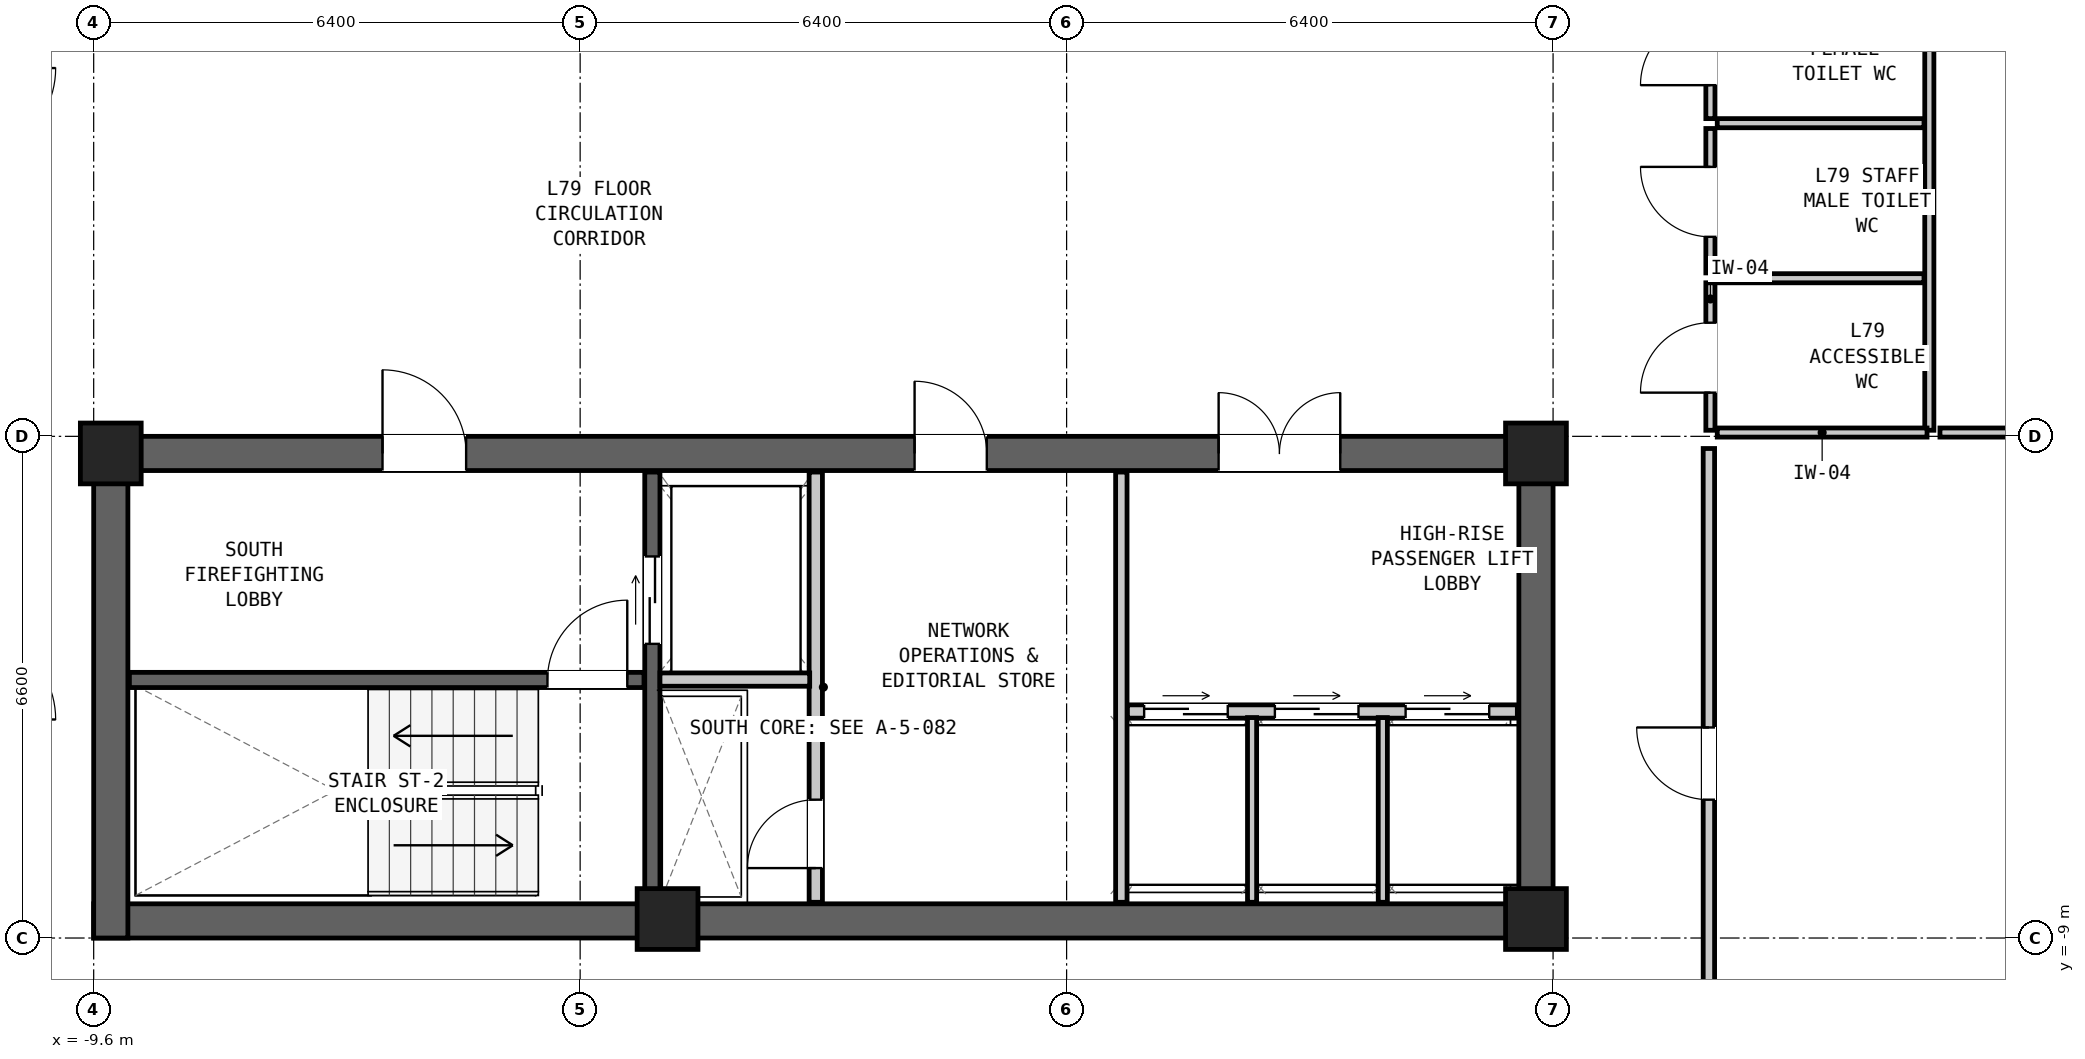
"""IFC4 building model, lengths in metres.
Left out: names, types, materials, properties, quantities, classifications, styles, units other than length and angle.
Written with IfcOpenShell. Run it as: python <this file> out.ifc"""

import sys

from ifc_helpers import new_model, si_unit, direction, frame, frame_2d, origin, origin_2d, place, context, subcontext, project, spatial, rectangle, extrude, element, fill, save


model = new_model("IFC4")
c1 = context("Model", 3, precision=1e-05, world=origin(), true_north=direction((0.0, 1.0)))
c2 = subcontext(c1, "Body", "Model", "MODEL_VIEW")
j1 = project(units=[si_unit("LENGTHUNIT", "METRE"), si_unit("PLANEANGLEUNIT", "RADIAN")], contexts=[c1])
p1 = place(None, origin())
s1 = spatial("IfcSite", under=j1, at=p1, CompositionType="ELEMENT")
p2 = place(p1, origin())
s2 = spatial("IfcBuilding", under=s1, at=p2, CompositionType="ELEMENT")
p3 = place(p2, frame((0.0, 0.0, 267.25)))
s3 = spatial("IfcBuildingStorey", under=s2, at=p3, CompositionType="ELEMENT", Elevation=267.25)
p4 = place(p3, frame((-9.6, -8.775, 0.0), z_axis=(0.0, 0.0, 1.0), x_axis=(1.0, 0.0, 0.0)))
e1 = element("IfcWall", 1, at=p4, inside=s3, PredefinedType="SHEAR", context=c2, shape_type="SweptSolid", body=[
    extrude(rectangle(XDim=19.2, YDim=0.45, at=frame_2d((9.6, 0.0))), origin(), (0.0, 0.0, 1.0), 3.05),
])
p5 = place(p3, frame((-9.6, -2.625, 0.0), z_axis=(0.0, 0.0, 1.0), x_axis=(1.0, 0.0, 0.0)))
e2 = element("IfcWall", 2, at=p5, inside=s3, PredefinedType="SHEAR", context=c2, shape_type="SweptSolid", body=[
    extrude(rectangle(XDim=19.2, YDim=0.45, at=frame_2d((9.6, 0.0))), origin(), (0.0, 0.0, 1.0), 3.05),
])
p6 = place(p5, frame((3.8, 0.0, 0.0)))
e3 = element("IfcOpeningElement", 3, at=p6, cuts=e2, PredefinedType="OPENING", context=c2, shape_type="SweptSolid", body=[
    extrude(rectangle(XDim=1.1, YDim=2.08, at=frame_2d((0.55, 1.04))), frame((0.0, 0.237, 0.0), z_axis=(0.0, -1.0, 0.0), x_axis=(1.0, 0.0, 0.0)), (0.0, 0.0, 1.0), 0.474),
])
p7 = place(p5, frame((10.8, 0.0, 0.0)))
e4 = element("IfcOpeningElement", 4, at=p7, cuts=e2, PredefinedType="OPENING", context=c2, shape_type="SweptSolid", body=[
    extrude(rectangle(XDim=0.95, YDim=2.1, at=frame_2d((0.475, 1.05))), frame((0.0, 0.237, 0.0), z_axis=(0.0, -1.0, 0.0), x_axis=(1.0, 0.0, 0.0)), (0.0, 0.0, 1.0), 0.474),
])
p8 = place(p5, frame((14.8, 0.0, 0.0)))
e5 = element("IfcOpeningElement", 5, at=p8, cuts=e2, PredefinedType="OPENING", context=c2, shape_type="SweptSolid", body=[
    extrude(rectangle(XDim=1.6, YDim=2.12, at=frame_2d((0.8, 1.06))), frame((0.0, 0.237, 0.0), z_axis=(0.0, -1.0, 0.0), x_axis=(1.0, 0.0, 0.0)), (0.0, 0.0, 1.0), 0.474),
])
for number, where, z_axis, x_axis in (
    (6, (-9.375, -9.0, 0.0), (0.0, 0.0, 1.0), (0.0, 1.0, 0.0)),
    (7, (9.375, -9.0, 0.0), (0.0, 0.0, 1.0), (0.0, 1.0, 0.0)),
):
    element("IfcWall", number, at=place(p3, frame(where, z_axis=z_axis, x_axis=x_axis)), inside=s3, PredefinedType="SHEAR", context=c2, shape_type="SweptSolid", body=[
        extrude(rectangle(XDim=6.6, YDim=0.45, at=frame_2d((3.3, 0.0))), origin(), (0.0, 0.0, 1.0), 3.05),
    ])
for number, where, z_axis, x_axis in (
    (8, (-9.375, -2.625, 0.0), (0.0, 0.0, 1.0), (1.0, 0.0, 0.0)),
    (9, (9.375, -2.625, 0.0), (0.0, 0.0, 1.0), (1.0, 0.0, 0.0)),
    (10, (-2.05, -8.75, 0.0), (0.0, 0.0, 1.0), (1.0, 0.0, 0.0)),
    (11, (9.375, -8.75, 0.0), (0.0, 0.0, 1.0), (1.0, 0.0, 0.0)),
):
    element("IfcColumn", number, at=place(p3, frame(where, z_axis=z_axis, x_axis=x_axis)), inside=s3, PredefinedType="COLUMN", context=c2, shape_type="SweptSolid", body=[
        extrude(rectangle(XDim=0.8, YDim=0.8, at=origin_2d()), origin(), (0.0, 0.0, 1.0), 3.05),
    ])
p9 = place(p3, frame((-9.13, -5.605, 0.0), z_axis=(0.0, 0.0, 1.0), x_axis=(1.0, 0.0, 0.0)))
e12 = element("IfcWall", 12, at=p9, inside=s3, PredefinedType="SHEAR", context=c2, shape_type="SweptSolid", body=[
    extrude(rectangle(XDim=6.77, YDim=0.2, at=frame_2d((3.385, 0.0))), origin(), (0.0, 0.0, 1.0), 2.86),
])
p10 = place(p9, frame((5.5, 0.0, 0.0)))
e13 = element("IfcOpeningElement", 13, at=p10, cuts=e12, PredefinedType="OPENING", context=c2, shape_type="SweptSolid", body=[
    extrude(rectangle(XDim=1.05, YDim=2.08, at=frame_2d((0.525, 1.04))), frame((0.0, 0.112, 0.0), z_axis=(0.0, -1.0, 0.0), x_axis=(1.0, 0.0, 0.0)), (0.0, 0.0, 1.0), 0.224),
])
p11 = place(p3, frame((-2.25, -8.53, 0.0), z_axis=(0.0, 0.0, 1.0), x_axis=(0.0, 1.0, 0.0)))
e14 = element("IfcWall", 14, at=p11, inside=s3, PredefinedType="SHEAR", context=c2, shape_type="SweptSolid", body=[
    extrude(rectangle(XDim=5.66, YDim=0.2, at=frame_2d((2.83, 0.0))), origin(), (0.0, 0.0, 1.0), 2.86),
])
p12 = place(p11, frame((3.4, 0.0, 0.0)))
e15 = element("IfcOpeningElement", 15, at=p12, cuts=e14, PredefinedType="OPENING", context=c2, shape_type="SweptSolid", body=[
    extrude(rectangle(XDim=1.15, YDim=2.08, at=frame_2d((0.575, 1.04))), frame((0.0, 0.112, 0.0), z_axis=(0.0, -1.0, 0.0), x_axis=(1.0, 0.0, 0.0)), (0.0, 0.0, 1.0), 0.224),
])
p13 = place(p3, frame((-0.1, -8.53, 0.0), z_axis=(0.0, 0.0, 1.0), x_axis=(0.0, 1.0, 0.0)))
e16 = element("IfcWall", 16, at=p13, inside=s3, PredefinedType="PARTITIONING", context=c2, shape_type="SweptSolid", body=[
    extrude(rectangle(XDim=5.66, YDim=0.175, at=frame_2d((2.83, 0.0))), origin(), (0.0, 0.0, 1.0), 2.86),
])
p14 = place(p13, frame((0.45, 0.0, 0.0)))
e17 = element("IfcOpeningElement", 17, at=p14, cuts=e16, PredefinedType="OPENING", context=c2, shape_type="SweptSolid", body=[
    extrude(rectangle(XDim=0.9, YDim=2.05, at=frame_2d((0.45, 1.025))), frame((0.0, 0.1, 0.0), z_axis=(0.0, -1.0, 0.0), x_axis=(1.0, 0.0, 0.0)), (0.0, 0.0, 1.0), 0.199),
])
p15 = place(p3, frame((-2.15, -5.6, 0.0), z_axis=(0.0, 0.0, 1.0), x_axis=(1.0, 0.0, 0.0)))
e18 = element("IfcWall", 18, at=p15, inside=s3, PredefinedType="PARTITIONING", context=c2, shape_type="SweptSolid", body=[
    extrude(rectangle(XDim=1.97, YDim=0.175, at=frame_2d((0.985, 0.0))), origin(), (0.0, 0.0, 1.0), 2.86),
])
p16 = place(p3, frame((3.92, -8.53, 0.0), z_axis=(0.0, 0.0, 1.0), x_axis=(0.0, 1.0, 0.0)))
e19 = element("IfcWall", 19, at=p16, inside=s3, PredefinedType="PARTITIONING", context=c2, shape_type="SweptSolid", body=[
    extrude(rectangle(XDim=5.66, YDim=0.15, at=frame_2d((2.83, 0.0))), origin(), (0.0, 0.0, 1.0), 2.86),
])
p17 = place(p3, frame((4.0, -6.02, 0.0), z_axis=(0.0, 0.0, 1.0), x_axis=(1.0, 0.0, 0.0)))
e20 = element("IfcWall", 20, at=p17, inside=s3, PredefinedType="PARTITIONING", context=c2, shape_type="SweptSolid", body=[
    extrude(rectangle(XDim=5.13, YDim=0.175, at=frame_2d((2.565, 0.0))), origin(), (0.0, 0.0, 1.0), 2.86),
])
p18 = place(p17, frame((0.22, 0.0, 0.0)))
e21 = element("IfcOpeningElement", 21, at=p18, cuts=e20, PredefinedType="OPENING", context=c2, shape_type="SweptSolid", body=[
    extrude(rectangle(XDim=1.1, YDim=2.06, at=frame_2d((0.55, 1.03))), frame((0.0, 0.1, 0.0), z_axis=(0.0, -1.0, 0.0), x_axis=(1.0, 0.0, 0.0)), (0.0, 0.0, 1.0), 0.199),
])
p19 = place(p17, frame((1.94, 0.0, 0.0)))
e22 = element("IfcOpeningElement", 22, at=p19, cuts=e20, PredefinedType="OPENING", context=c2, shape_type="SweptSolid", body=[
    extrude(rectangle(XDim=1.1, YDim=2.06, at=frame_2d((0.55, 1.03))), frame((0.0, 0.1, 0.0), z_axis=(0.0, -1.0, 0.0), x_axis=(1.0, 0.0, 0.0)), (0.0, 0.0, 1.0), 0.199),
])
p20 = place(p17, frame((3.66, 0.0, 0.0)))
e23 = element("IfcOpeningElement", 23, at=p20, cuts=e20, PredefinedType="OPENING", context=c2, shape_type="SweptSolid", body=[
    extrude(rectangle(XDim=1.1, YDim=2.06, at=frame_2d((0.55, 1.03))), frame((0.0, 0.1, 0.0), z_axis=(0.0, -1.0, 0.0), x_axis=(1.0, 0.0, 0.0)), (0.0, 0.0, 1.0), 0.199),
])
for number, where, z_axis, x_axis in (
    (24, (5.64, -8.53, 0.0), (0.0, 0.0, 1.0), (0.0, 1.0, 0.0)),
    (25, (7.36, -8.53, 0.0), (0.0, 0.0, 1.0), (0.0, 1.0, 0.0)),
):
    element("IfcWall", number, at=place(p3, frame(where, z_axis=z_axis, x_axis=x_axis)), inside=s3, PredefinedType="PARTITIONING", context=c2, shape_type="SweptSolid", body=[
        extrude(rectangle(XDim=2.43, YDim=0.12, at=frame_2d((1.215, 0.0))), origin(), (0.0, 0.0, 1.0), 2.86),
    ])
p21 = place(p3, frame((11.67, -2.32, 0.0), z_axis=(0.0, 0.0, 1.0), x_axis=(0.0, 1.0, 0.0)))
e26 = element("IfcWall", 26, at=p21, inside=s3, PredefinedType="PARTITIONING", context=c2, shape_type="SweptSolid", body=[
    extrude(rectangle(XDim=1.94, YDim=0.12, at=frame_2d((0.97, 0.0))), origin(), (0.0, 0.0, 1.0), 2.86),
])
p22 = place(p21, frame((0.495, 0.0, 0.0)))
e27 = element("IfcOpeningElement", 27, at=p22, cuts=e26, PredefinedType="OPENING", context=c2, shape_type="SweptSolid", body=[
    extrude(rectangle(XDim=0.92, YDim=2.1, at=frame_2d((0.46, 1.05))), frame((0.0, 0.072, 0.0), z_axis=(0.0, -1.0, 0.0), x_axis=(1.0, 0.0, 0.0)), (0.0, 0.0, 1.0), 0.144),
])
p23 = place(p3, frame((11.67, -0.25, 0.0), z_axis=(0.0, 0.0, 1.0), x_axis=(0.0, 1.0, 0.0)))
e28 = element("IfcWall", 28, at=p23, inside=s3, PredefinedType="PARTITIONING", context=c2, shape_type="SweptSolid", body=[
    extrude(rectangle(XDim=1.9, YDim=0.12, at=frame_2d((0.95, 0.0))), origin(), (0.0, 0.0, 1.0), 2.86),
])
p24 = place(p23, frame((0.475, 0.0, 0.0)))
e29 = element("IfcOpeningElement", 29, at=p24, cuts=e28, PredefinedType="OPENING", context=c2, shape_type="SweptSolid", body=[
    extrude(rectangle(XDim=0.92, YDim=2.1, at=frame_2d((0.46, 1.05))), frame((0.0, 0.072, 0.0), z_axis=(0.0, -1.0, 0.0), x_axis=(1.0, 0.0, 0.0)), (0.0, 0.0, 1.0), 0.144),
])
p25 = place(p3, frame((11.67, 1.78, 0.0), z_axis=(0.0, 0.0, 1.0), x_axis=(0.0, 1.0, 0.0)))
e30 = element("IfcWall", 30, at=p25, inside=s3, PredefinedType="PARTITIONING", context=c2, shape_type="SweptSolid", body=[
    extrude(rectangle(XDim=1.83, YDim=0.12, at=frame_2d((0.915, 0.0))), origin(), (0.0, 0.0, 1.0), 2.86),
])
p26 = place(p25, frame((0.44, 0.0, 0.0)))
e31 = element("IfcOpeningElement", 31, at=p26, cuts=e30, PredefinedType="OPENING", context=c2, shape_type="SweptSolid", body=[
    extrude(rectangle(XDim=0.92, YDim=2.1, at=frame_2d((0.46, 1.05))), frame((0.0, 0.072, 0.0), z_axis=(0.0, -1.0, 0.0), x_axis=(1.0, 0.0, 0.0)), (0.0, 0.0, 1.0), 0.144),
])
p27 = place(p3, frame((14.55, -2.32, 0.0), z_axis=(0.0, 0.0, 1.0), x_axis=(0.0, 1.0, 0.0)))
e32 = element("IfcWall", 32, at=p27, inside=s3, PredefinedType="PARTITIONING", context=c2, shape_type="SweptSolid", body=[
    extrude(rectangle(XDim=5.93, YDim=0.12, at=frame_2d((2.965, 0.0))), origin(), (0.0, 0.0, 1.0), 2.86),
])
p28 = place(p3, frame((11.76, -2.35, 0.0), z_axis=(0.0, 0.0, 1.0), x_axis=(1.0, 0.0, 0.0)))
e33 = element("IfcWall", 33, at=p28, inside=s3, PredefinedType="PARTITIONING", context=c2, shape_type="SweptSolid", body=[
    extrude(rectangle(XDim=2.76, YDim=0.12, at=frame_2d((1.38, 0.0))), origin(), (0.0, 0.0, 1.0), 1.04),
])
for number, where, z_axis, x_axis in (
    (34, (11.76, -0.32, 0.0), (0.0, 0.0, 1.0), (1.0, 0.0, 0.0)),
    (35, (11.76, 1.72, 0.0), (0.0, 0.0, 1.0), (1.0, 0.0, 0.0)),
):
    element("IfcWall", number, at=place(p3, frame(where, z_axis=z_axis, x_axis=x_axis)), inside=s3, PredefinedType="PARTITIONING", context=c2, shape_type="SweptSolid", body=[
        extrude(rectangle(XDim=2.72, YDim=0.12, at=frame_2d((1.36, 0.0))), origin(), (0.0, 0.0, 1.0), 2.86),
    ])
p29 = place(p3, frame((14.69, -2.35, 0.0), z_axis=(0.0, 0.0, 1.0), x_axis=(1.0, 0.0, 0.0)))
e36 = element("IfcWall", 36, at=p29, inside=s3, PredefinedType="PARTITIONING", context=c2, shape_type="SweptSolid", body=[
    extrude(rectangle(XDim=6.927, YDim=0.12, at=frame_2d((3.464, 0.0))), origin(), (0.0, 0.0, 1.0), 1.04),
])
p30 = place(p3, frame((11.65, -10.85, 0.0), z_axis=(0.0, 0.0, 1.0), x_axis=(0.0, 1.0, 0.0)))
e37 = element("IfcWall", 37, at=p30, inside=s3, PredefinedType="PARTITIONING", context=c2, shape_type="SweptSolid", body=[
    extrude(rectangle(XDim=8.29, YDim=0.15, at=frame_2d((4.145, 0.0))), origin(), (0.0, 0.0, 1.0), 2.86),
])
p31 = place(p30, frame((3.67, 0.0, 0.0)))
e38 = element("IfcOpeningElement", 38, at=p31, cuts=e37, PredefinedType="OPENING", context=c2, shape_type="SweptSolid", body=[
    extrude(rectangle(XDim=0.95, YDim=2.1, at=frame_2d((0.475, 1.05))), frame((0.0, 0.087, 0.0), z_axis=(0.0, -1.0, 0.0), x_axis=(1.0, 0.0, 0.0)), (0.0, 0.0, 1.0), 0.174),
])
p32 = place(p10, origin())
e39 = element("IfcDoor", 39, at=p32, inside=s3, OperationType="SINGLE_SWING_RIGHT", PredefinedType="DOOR", context=c2, shape_type="SweptSolid", body=[
    extrude(rectangle(XDim=1.05, YDim=2.08, at=frame_2d((0.525, 1.04))), frame((0.0, 0.025, 0.0), z_axis=(0.0, -1.0, 0.0), x_axis=(1.0, 0.0, 0.0)), (0.0, 0.0, 1.0), 0.05),
])
fill(e13, e39)
p33 = place(p6, origin())
e40 = element("IfcDoor", 40, at=p33, inside=s3, OperationType="SINGLE_SWING_LEFT", PredefinedType="DOOR", context=c2, shape_type="SweptSolid", body=[
    extrude(rectangle(XDim=1.1, YDim=2.08, at=frame_2d((0.55, 1.04))), frame((0.0, 0.025, 0.0), z_axis=(0.0, -1.0, 0.0), x_axis=(1.0, 0.0, 0.0)), (0.0, 0.0, 1.0), 0.05),
])
fill(e3, e40)
p34 = place(p12, origin())
e41 = element("IfcDoor", 41, at=p34, inside=s3, OperationType="DOUBLE_DOOR_SLIDING", PredefinedType="DOOR", context=c2, shape_type="SweptSolid", body=[
    extrude(rectangle(XDim=1.15, YDim=2.08, at=frame_2d((0.575, 1.04))), frame((0.0, 0.025, 0.0), z_axis=(0.0, -1.0, 0.0), x_axis=(1.0, 0.0, 0.0)), (0.0, 0.0, 1.0), 0.05),
])
fill(e15, e41)
p35 = place(p14, origin())
e42 = element("IfcDoor", 42, at=p35, inside=s3, OperationType="SINGLE_SWING_LEFT", PredefinedType="DOOR", context=c2, shape_type="SweptSolid", body=[
    extrude(rectangle(XDim=0.9, YDim=2.05, at=frame_2d((0.45, 1.025))), frame((0.0, 0.025, 0.0), z_axis=(0.0, -1.0, 0.0), x_axis=(1.0, 0.0, 0.0)), (0.0, 0.0, 1.0), 0.05),
])
fill(e17, e42)
p36 = place(p7, origin())
e43 = element("IfcDoor", 43, at=p36, inside=s3, OperationType="SINGLE_SWING_LEFT", PredefinedType="DOOR", context=c2, shape_type="SweptSolid", body=[
    extrude(rectangle(XDim=0.95, YDim=2.1, at=frame_2d((0.475, 1.05))), frame((0.0, 0.025, 0.0), z_axis=(0.0, -1.0, 0.0), x_axis=(1.0, 0.0, 0.0)), (0.0, 0.0, 1.0), 0.05),
])
fill(e4, e43)
p37 = place(p18, origin())
e44 = element("IfcDoor", 44, at=p37, inside=s3, OperationType="DOUBLE_DOOR_SLIDING", PredefinedType="DOOR", context=c2, shape_type="SweptSolid", body=[
    extrude(rectangle(XDim=1.1, YDim=2.06, at=frame_2d((0.55, 1.03))), frame((0.0, 0.025, 0.0), z_axis=(0.0, -1.0, 0.0), x_axis=(1.0, 0.0, 0.0)), (0.0, 0.0, 1.0), 0.05),
])
fill(e21, e44)
p38 = place(p19, origin())
e45 = element("IfcDoor", 45, at=p38, inside=s3, OperationType="DOUBLE_DOOR_SLIDING", PredefinedType="DOOR", context=c2, shape_type="SweptSolid", body=[
    extrude(rectangle(XDim=1.1, YDim=2.06, at=frame_2d((0.55, 1.03))), frame((0.0, 0.025, 0.0), z_axis=(0.0, -1.0, 0.0), x_axis=(1.0, 0.0, 0.0)), (0.0, 0.0, 1.0), 0.05),
])
fill(e22, e45)
p39 = place(p20, origin())
e46 = element("IfcDoor", 46, at=p39, inside=s3, OperationType="DOUBLE_DOOR_SLIDING", PredefinedType="DOOR", context=c2, shape_type="SweptSolid", body=[
    extrude(rectangle(XDim=1.1, YDim=2.06, at=frame_2d((0.55, 1.03))), frame((0.0, 0.025, 0.0), z_axis=(0.0, -1.0, 0.0), x_axis=(1.0, 0.0, 0.0)), (0.0, 0.0, 1.0), 0.05),
])
fill(e23, e46)
p40 = place(p8, origin())
e47 = element("IfcDoor", 47, at=p40, inside=s3, OperationType="DOUBLE_DOOR_SINGLE_SWING", PredefinedType="DOOR", context=c2, shape_type="SweptSolid", body=[
    extrude(rectangle(XDim=1.6, YDim=2.12, at=frame_2d((0.8, 1.06))), frame((0.0, 0.025, 0.0), z_axis=(0.0, -1.0, 0.0), x_axis=(1.0, 0.0, 0.0)), (0.0, 0.0, 1.0), 0.05),
])
fill(e5, e47)
p41 = place(p22, origin())
e48 = element("IfcDoor", 48, at=p41, inside=s3, OperationType="SINGLE_SWING_LEFT", PredefinedType="DOOR", context=c2, shape_type="SweptSolid", body=[
    extrude(rectangle(XDim=0.92, YDim=2.1, at=frame_2d((0.46, 1.05))), frame((0.0, 0.025, 0.0), z_axis=(0.0, -1.0, 0.0), x_axis=(1.0, 0.0, 0.0)), (0.0, 0.0, 1.0), 0.05),
])
fill(e27, e48)
p42 = place(p24, origin())
e49 = element("IfcDoor", 49, at=p42, inside=s3, OperationType="SINGLE_SWING_RIGHT", PredefinedType="DOOR", context=c2, shape_type="SweptSolid", body=[
    extrude(rectangle(XDim=0.92, YDim=2.1, at=frame_2d((0.46, 1.05))), frame((0.0, 0.025, 0.0), z_axis=(0.0, -1.0, 0.0), x_axis=(1.0, 0.0, 0.0)), (0.0, 0.0, 1.0), 0.05),
])
fill(e29, e49)
p43 = place(p26, origin())
e50 = element("IfcDoor", 50, at=p43, inside=s3, OperationType="SINGLE_SWING_LEFT", PredefinedType="DOOR", context=c2, shape_type="SweptSolid", body=[
    extrude(rectangle(XDim=0.92, YDim=2.1, at=frame_2d((0.46, 1.05))), frame((0.0, 0.025, 0.0), z_axis=(0.0, -1.0, 0.0), x_axis=(1.0, 0.0, 0.0)), (0.0, 0.0, 1.0), 0.05),
])
fill(e31, e50)
p44 = place(p31, origin())
e51 = element("IfcDoor", 51, at=p44, inside=s3, OperationType="SINGLE_SWING_RIGHT", PredefinedType="DOOR", context=c2, shape_type="SweptSolid", body=[
    extrude(rectangle(XDim=0.95, YDim=2.1, at=frame_2d((0.475, 1.05))), frame((0.0, 0.025, 0.0), z_axis=(0.0, -1.0, 0.0), x_axis=(1.0, 0.0, 0.0)), (0.0, 0.0, 1.0), 0.05),
])
fill(e38, e51)
save(model, sys.argv[1])
